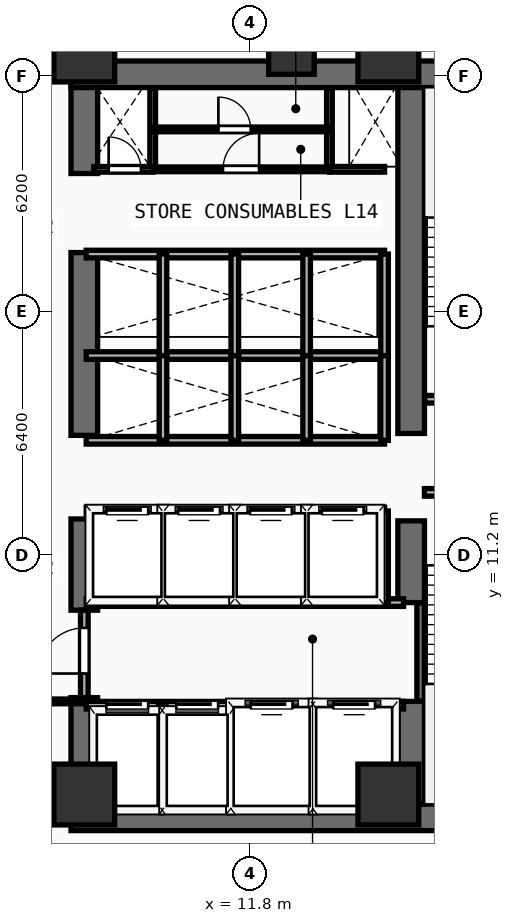
"""IFC4 building model, lengths in metres.
Left out: names, types, materials, properties, quantities, classifications, styles, units other than length and angle.
Written with IfcOpenShell. Run it as: python <this file> out.ifc"""

import sys

from ifc_helpers import new_model, si_unit, direction, frame, frame_2d, origin, origin_2d, place, context, subcontext, project, spatial, rectangle, extrude, element, fill, save


model = new_model("IFC4")
c1 = context("Model", 3, precision=1e-05, world=origin(), true_north=direction((0.0, 1.0)))
c2 = subcontext(c1, "Body", "Model", "MODEL_VIEW")
j1 = project(units=[si_unit("LENGTHUNIT", "METRE"), si_unit("PLANEANGLEUNIT", "RADIAN")], contexts=[c1])
p1 = place(None, origin())
s1 = spatial("IfcSite", under=j1, at=p1, CompositionType="ELEMENT")
p2 = place(p1, origin())
s2 = spatial("IfcBuilding", under=s1, at=p2, CompositionType="ELEMENT")
p3 = place(p2, frame((0.0, 0.0, 56.2)))
s3 = spatial("IfcBuildingStorey", under=s2, at=p3, CompositionType="ELEMENT", Elevation=56.2)
for number, where, z_axis, x_axis in (
    (1, (7.1, 4.3, 0.0), (0.0, 0.0, 1.0), (1.0, 0.0, 0.0)),
    (2, (7.1, 23.85, 0.0), (0.0, 0.0, 1.0), (1.0, 0.0, 0.0)),
):
    element("IfcWall", number, at=place(p3, frame(where, z_axis=z_axis, x_axis=x_axis)), inside=s3, PredefinedType="SHEAR", context=c2, shape_type="SweptSolid", body=[
        extrude(rectangle(XDim=14.05, YDim=0.7, at=frame_2d((7.025, 0.0))), origin(), (0.0, 0.0, 1.0), 3.54),
    ])
p4 = place(p3, frame((7.45, 4.65, 0.0), z_axis=(0.0, 0.0, 1.0), x_axis=(0.0, 1.0, 0.0)))
e3 = element("IfcWall", 3, at=p4, inside=s3, PredefinedType="SHEAR", context=c2, shape_type="SweptSolid", body=[
    extrude(rectangle(XDim=2.8, YDim=0.7, at=frame_2d((1.4, 0.0))), origin(), (0.0, 0.0, 1.0), 3.54),
])
p5 = place(p3, frame((7.45, 9.75, 0.0), z_axis=(0.0, 0.0, 1.0), x_axis=(0.0, 1.0, 0.0)))
e4 = element("IfcWall", 4, at=p5, inside=s3, PredefinedType="SHEAR", context=c2, shape_type="SweptSolid", body=[
    extrude(rectangle(XDim=2.4, YDim=0.7, at=frame_2d((1.2, 0.0))), origin(), (0.0, 0.0, 1.0), 3.54),
])
p6 = place(p3, frame((7.45, 14.35, 0.0), z_axis=(0.0, 0.0, 1.0), x_axis=(0.0, 1.0, 0.0)))
e5 = element("IfcWall", 5, at=p6, inside=s3, PredefinedType="SHEAR", context=c2, shape_type="SweptSolid", body=[
    extrude(rectangle(XDim=4.81, YDim=0.7, at=frame_2d((2.405, 0.0))), origin(), (0.0, 0.0, 1.0), 3.54),
])
p7 = place(p3, frame((7.45, 21.24, 0.0), z_axis=(0.0, 0.0, 1.0), x_axis=(0.0, 1.0, 0.0)))
e6 = element("IfcWall", 6, at=p7, inside=s3, PredefinedType="SHEAR", context=c2, shape_type="SweptSolid", body=[
    extrude(rectangle(XDim=2.26, YDim=0.7, at=frame_2d((1.13, 0.0))), origin(), (0.0, 0.0, 1.0), 3.54),
])
p8 = place(p3, frame((16.05, 4.65, 0.0), z_axis=(0.0, 0.0, 1.0), x_axis=(0.0, 1.0, 0.0)))
e7 = element("IfcWall", 7, at=p8, inside=s3, PredefinedType="SHEAR", context=c2, shape_type="SweptSolid", body=[
    extrude(rectangle(XDim=2.7, YDim=0.7, at=frame_2d((1.35, 0.0))), origin(), (0.0, 0.0, 1.0), 3.54),
])
p9 = place(p3, frame((16.05, 9.95, 0.0), z_axis=(0.0, 0.0, 1.0), x_axis=(0.0, 1.0, 0.0)))
e8 = element("IfcWall", 8, at=p9, inside=s3, PredefinedType="SHEAR", context=c2, shape_type="SweptSolid", body=[
    extrude(rectangle(XDim=2.15, YDim=0.7, at=frame_2d((1.075, 0.0))), origin(), (0.0, 0.0, 1.0), 3.54),
])
p10 = place(p3, frame((16.05, 14.4, 0.0), z_axis=(0.0, 0.0, 1.0), x_axis=(0.0, 1.0, 0.0)))
e9 = element("IfcWall", 9, at=p10, inside=s3, PredefinedType="SHEAR", context=c2, shape_type="SweptSolid", body=[
    extrude(rectangle(XDim=9.1, YDim=0.7, at=frame_2d((4.55, 0.0))), origin(), (0.0, 0.0, 1.0), 3.54),
])
for number, where, z_axis, x_axis in (
    (10, (7.45, 4.9, 0.0), (0.0, 0.0, 1.0), (1.0, 0.0, 0.0)),
    (11, (15.45, 4.9, 0.0), (0.0, 0.0, 1.0), (1.0, 0.0, 0.0)),
    (12, (7.45, 24.45, 0.0), (0.0, 0.0, 1.0), (1.0, 0.0, 0.0)),
    (13, (15.45, 24.45, 0.0), (0.0, 0.0, 1.0), (1.0, 0.0, 0.0)),
):
    element("IfcColumn", number, at=place(p3, frame(where, z_axis=z_axis, x_axis=x_axis)), inside=s3, PredefinedType="COLUMN", context=c2, shape_type="SweptSolid", body=[
        extrude(rectangle(XDim=1.6, YDim=1.6, at=origin_2d()), origin(), (0.0, 0.0, 1.0), 3.54),
    ])
p11 = place(p3, frame((12.9, 24.45, 0.0), z_axis=(0.0, 0.0, 1.0), x_axis=(1.0, 0.0, 0.0)))
e14 = element("IfcColumn", 14, at=p11, inside=s3, PredefinedType="COLUMN", context=c2, shape_type="SweptSolid", body=[
    extrude(rectangle(XDim=1.2, YDim=1.2, at=origin_2d()), origin(), (0.0, 0.0, 1.0), 3.54),
])
p12 = place(p3, frame((16.3, 7.36, 0.0), z_axis=(0.0, 0.0, 1.0), x_axis=(0.0, 1.0, 0.0)))
e15 = element("IfcWall", 15, at=p12, inside=s3, PredefinedType="SHEAR", context=c2, shape_type="SweptSolid", body=[
    extrude(rectangle(XDim=2.58, YDim=0.2, at=frame_2d((1.29, 0.0))), origin(), (0.0, 0.0, 1.0), 3.54),
])
p13 = place(p3, frame((16.4, 12.85, 0.0), z_axis=(0.0, 0.0, 1.0), x_axis=(1.0, 0.0, 0.0)))
e16 = element("IfcWall", 16, at=p13, inside=s3, PredefinedType="PARTITIONING", context=c2, shape_type="SweptSolid", body=[
    extrude(rectangle(XDim=3.96, YDim=0.2, at=frame_2d((1.98, 0.0))), origin(), (0.0, 0.0, 1.0), 3.54),
])
p14 = place(p13, frame((1.304, 0.0, 0.0)))
e17 = element("IfcOpeningElement", 17, at=p14, cuts=e16, PredefinedType="OPENING", context=c2, shape_type="SweptSolid", body=[
    extrude(rectangle(XDim=1.1, YDim=2.2, at=frame_2d((0.55, 1.1))), frame((0.0, 0.11, 0.0), z_axis=(0.0, -1.0, 0.0), x_axis=(1.0, 0.0, 0.0)), (0.0, 0.0, 1.0), 0.22),
])
p15 = place(p3, frame((16.41, 15.3, 0.0), z_axis=(0.0, 0.0, 1.0), x_axis=(1.0, 0.0, 0.0)))
e18 = element("IfcWall", 18, at=p15, inside=s3, PredefinedType="PARTITIONING", context=c2, shape_type="SweptSolid", body=[
    extrude(rectangle(XDim=3.95, YDim=0.2, at=frame_2d((1.975, 0.0))), origin(), (0.0, 0.0, 1.0), 3.54),
])
p16 = place(p15, frame((1.294, 0.0, 0.0)))
e19 = element("IfcOpeningElement", 19, at=p16, cuts=e18, PredefinedType="OPENING", context=c2, shape_type="SweptSolid", body=[
    extrude(rectangle(XDim=1.1, YDim=2.2, at=frame_2d((0.55, 1.1))), frame((0.0, 0.11, 0.0), z_axis=(0.0, -1.0, 0.0), x_axis=(1.0, 0.0, 0.0)), (0.0, 0.0, 1.0), 0.22),
])
p17 = place(p3, frame((7.5, 7.25, 0.0), z_axis=(0.0, 0.0, 1.0), x_axis=(1.0, 0.0, 0.0)))
e20 = element("IfcWall", 20, at=p17, inside=s3, PredefinedType="PARTITIONING", context=c2, shape_type="SweptSolid", body=[
    extrude(rectangle(XDim=8.35, YDim=0.2, at=frame_2d((4.175, 0.0))), origin(), (0.0, 0.0, 1.0), 3.54),
])
p18 = place(p17, frame((0.53, 0.0, 0.0)))
e21 = element("IfcOpeningElement", 21, at=p18, cuts=e20, PredefinedType="OPENING", context=c2, shape_type="SweptSolid", body=[
    extrude(rectangle(XDim=1.1, YDim=2.2, at=frame_2d((0.55, 1.1))), frame((0.0, 0.11, 0.0), z_axis=(0.0, -1.0, 0.0), x_axis=(1.0, 0.0, 0.0)), (0.0, 0.0, 1.0), 0.22),
])
p19 = place(p17, frame((2.37, 0.0, 0.0)))
e22 = element("IfcOpeningElement", 22, at=p19, cuts=e20, PredefinedType="OPENING", context=c2, shape_type="SweptSolid", body=[
    extrude(rectangle(XDim=1.1, YDim=2.2, at=frame_2d((0.55, 1.1))), frame((0.0, 0.11, 0.0), z_axis=(0.0, -1.0, 0.0), x_axis=(1.0, 0.0, 0.0)), (0.0, 0.0, 1.0), 0.22),
])
p20 = place(p17, frame((4.33, 0.0, 0.0)))
e23 = element("IfcOpeningElement", 23, at=p20, cuts=e20, PredefinedType="OPENING", context=c2, shape_type="SweptSolid", body=[
    extrude(rectangle(XDim=1.1, YDim=2.2, at=frame_2d((0.55, 1.1))), frame((0.0, 0.11, 0.0), z_axis=(0.0, -1.0, 0.0), x_axis=(1.0, 0.0, 0.0)), (0.0, 0.0, 1.0), 0.22),
])
p21 = place(p17, frame((6.5, 0.0, 0.0)))
e24 = element("IfcOpeningElement", 24, at=p21, cuts=e20, PredefinedType="OPENING", context=c2, shape_type="SweptSolid", body=[
    extrude(rectangle(XDim=1.1, YDim=2.2, at=frame_2d((0.55, 1.1))), frame((0.0, 0.11, 0.0), z_axis=(0.0, -1.0, 0.0), x_axis=(1.0, 0.0, 0.0)), (0.0, 0.0, 1.0), 0.22),
])
p22 = place(p3, frame((7.5, 9.95, 0.0), z_axis=(0.0, 0.0, 1.0), x_axis=(1.0, 0.0, 0.0)))
e25 = element("IfcWall", 25, at=p22, inside=s3, PredefinedType="PARTITIONING", context=c2, shape_type="SweptSolid", body=[
    extrude(rectangle(XDim=8.35, YDim=0.2, at=frame_2d((4.175, 0.0))), origin(), (0.0, 0.0, 1.0), 3.54),
])
for number, where, z_axis, x_axis in (
    (26, (9.5, 4.45, 0.0), (0.0, 0.0, 1.0), (0.0, 1.0, 0.0)),
    (27, (11.36, 4.45, 0.0), (0.0, 0.0, 1.0), (0.0, 1.0, 0.0)),
    (28, (13.46, 4.45, 0.0), (0.0, 0.0, 1.0), (0.0, 1.0, 0.0)),
):
    element("IfcWall", number, at=place(p3, frame(where, z_axis=z_axis, x_axis=x_axis)), inside=s3, PredefinedType="PARTITIONING", context=c2, shape_type="SweptSolid", body=[
        extrude(rectangle(XDim=2.8, YDim=0.2, at=frame_2d((1.4, 0.0))), origin(), (0.0, 0.0, 1.0), 3.54),
    ])
p23 = place(p3, frame((7.45, 7.45, 0.0), z_axis=(0.0, 0.0, 1.0), x_axis=(0.0, 1.0, 0.0)))
e29 = element("IfcWall", 29, at=p23, inside=s3, PredefinedType="PARTITIONING", context=c2, shape_type="SweptSolid", body=[
    extrude(rectangle(XDim=2.3, YDim=0.2, at=frame_2d((1.15, 0.0))), origin(), (0.0, 0.0, 1.0), 2.52),
])
p24 = place(p23, frame((0.633, 0.0, 0.0)))
e30 = element("IfcOpeningElement", 30, at=p24, cuts=e29, PredefinedType="OPENING", context=c2, shape_type="SweptSolid", body=[
    extrude(rectangle(XDim=1.2, YDim=2.25, at=frame_2d((0.6, 1.125))), frame((0.0, 0.11, 0.0), z_axis=(0.0, -1.0, 0.0), x_axis=(1.0, 0.0, 0.0)), (0.0, 0.0, 1.0), 0.22),
])
p25 = place(p3, frame((7.5, 12.36, 0.0), z_axis=(0.0, 0.0, 1.0), x_axis=(1.0, 0.0, 0.0)))
e31 = element("IfcWall", 31, at=p25, inside=s3, PredefinedType="PARTITIONING", context=c2, shape_type="SweptSolid", body=[
    extrude(rectangle(XDim=7.85, YDim=0.2, at=frame_2d((3.925, 0.0))), origin(), (0.0, 0.0, 1.0), 3.54),
])
p26 = place(p25, frame((0.53, 0.0, 0.0)))
e32 = element("IfcOpeningElement", 32, at=p26, cuts=e31, PredefinedType="OPENING", context=c2, shape_type="SweptSolid", body=[
    extrude(rectangle(XDim=1.1, YDim=2.2, at=frame_2d((0.55, 1.1))), frame((0.0, 0.11, 0.0), z_axis=(0.0, -1.0, 0.0), x_axis=(1.0, 0.0, 0.0)), (0.0, 0.0, 1.0), 0.22),
])
p27 = place(p25, frame((2.42, 0.0, 0.0)))
e33 = element("IfcOpeningElement", 33, at=p27, cuts=e31, PredefinedType="OPENING", context=c2, shape_type="SweptSolid", body=[
    extrude(rectangle(XDim=1.1, YDim=2.2, at=frame_2d((0.55, 1.1))), frame((0.0, 0.11, 0.0), z_axis=(0.0, -1.0, 0.0), x_axis=(1.0, 0.0, 0.0)), (0.0, 0.0, 1.0), 0.22),
])
p28 = place(p25, frame((4.31, 0.0, 0.0)))
e34 = element("IfcOpeningElement", 34, at=p28, cuts=e31, PredefinedType="OPENING", context=c2, shape_type="SweptSolid", body=[
    extrude(rectangle(XDim=1.1, YDim=2.2, at=frame_2d((0.55, 1.1))), frame((0.0, 0.11, 0.0), z_axis=(0.0, -1.0, 0.0), x_axis=(1.0, 0.0, 0.0)), (0.0, 0.0, 1.0), 0.22),
])
p29 = place(p25, frame((6.2, 0.0, 0.0)))
e35 = element("IfcOpeningElement", 35, at=p29, cuts=e31, PredefinedType="OPENING", context=c2, shape_type="SweptSolid", body=[
    extrude(rectangle(XDim=1.1, YDim=2.2, at=frame_2d((0.55, 1.1))), frame((0.0, 0.11, 0.0), z_axis=(0.0, -1.0, 0.0), x_axis=(1.0, 0.0, 0.0)), (0.0, 0.0, 1.0), 0.22),
])
for number, where, z_axis, x_axis in (
    (36, (15.35, 9.95, 0.0), (0.0, 0.0, 1.0), (0.0, 1.0, 0.0)),
    (37, (9.52, 9.95, 0.0), (0.0, 0.0, 1.0), (0.0, 1.0, 0.0)),
    (38, (11.41, 9.95, 0.0), (0.0, 0.0, 1.0), (0.0, 1.0, 0.0)),
    (39, (13.3, 9.95, 0.0), (0.0, 0.0, 1.0), (0.0, 1.0, 0.0)),
):
    element("IfcWall", number, at=place(p3, frame(where, z_axis=z_axis, x_axis=x_axis)), inside=s3, PredefinedType="PARTITIONING", context=c2, shape_type="SweptSolid", body=[
        extrude(rectangle(XDim=2.41, YDim=0.2, at=frame_2d((1.205, 0.0))), origin(), (0.0, 0.0, 1.0), 3.54),
    ])
for number, where, z_axis, x_axis in (
    (40, (7.5, 14.22, 0.0), (0.0, 0.0, 1.0), (1.0, 0.0, 0.0)),
    (41, (7.5, 16.45, 0.0), (0.0, 0.0, 1.0), (1.0, 0.0, 0.0)),
):
    element("IfcWall", number, at=place(p3, frame(where, z_axis=z_axis, x_axis=x_axis)), inside=s3, PredefinedType="PARTITIONING", context=c2, shape_type="SweptSolid", body=[
        extrude(rectangle(XDim=7.85, YDim=0.2, at=frame_2d((3.925, 0.0))), origin(), (0.0, 0.0, 1.0), 3.54),
    ])
for number, where, z_axis, x_axis in (
    (42, (15.35, 14.22, 0.0), (0.0, 0.0, 1.0), (0.0, 1.0, 0.0)),
    (43, (9.52, 14.22, 0.0), (0.0, 0.0, 1.0), (0.0, 1.0, 0.0)),
    (44, (11.41, 14.22, 0.0), (0.0, 0.0, 1.0), (0.0, 1.0, 0.0)),
    (45, (13.3, 14.22, 0.0), (0.0, 0.0, 1.0), (0.0, 1.0, 0.0)),
):
    element("IfcWall", number, at=place(p3, frame(where, z_axis=z_axis, x_axis=x_axis)), inside=s3, PredefinedType="PARTITIONING", context=c2, shape_type="SweptSolid", body=[
        extrude(rectangle(XDim=2.23, YDim=0.2, at=frame_2d((1.115, 0.0))), origin(), (0.0, 0.0, 1.0), 3.54),
    ])
p30 = place(p3, frame((7.5, 19.12, 0.0), z_axis=(0.0, 0.0, 1.0), x_axis=(1.0, 0.0, 0.0)))
e46 = element("IfcWall", 46, at=p30, inside=s3, PredefinedType="PARTITIONING", context=c2, shape_type="SweptSolid", body=[
    extrude(rectangle(XDim=7.85, YDim=0.2, at=frame_2d((3.925, 0.0))), origin(), (0.0, 0.0, 1.0), 3.54),
])
for number, where, z_axis, x_axis in (
    (47, (15.35, 16.45, 0.0), (0.0, 0.0, 1.0), (0.0, 1.0, 0.0)),
    (48, (9.52, 16.45, 0.0), (0.0, 0.0, 1.0), (0.0, 1.0, 0.0)),
    (49, (11.41, 16.45, 0.0), (0.0, 0.0, 1.0), (0.0, 1.0, 0.0)),
    (50, (13.3, 16.45, 0.0), (0.0, 0.0, 1.0), (0.0, 1.0, 0.0)),
):
    element("IfcWall", number, at=place(p3, frame(where, z_axis=z_axis, x_axis=x_axis)), inside=s3, PredefinedType="PARTITIONING", context=c2, shape_type="SweptSolid", body=[
        extrude(rectangle(XDim=2.67, YDim=0.2, at=frame_2d((1.335, 0.0))), origin(), (0.0, 0.0, 1.0), 3.54),
    ])
for number, where, z_axis, x_axis in (
    (51, (9.25, 21.35, 0.0), (0.0, 0.0, 1.0), (0.0, 1.0, 0.0)),
    (52, (13.9, 21.35, 0.0), (0.0, 0.0, 1.0), (0.0, 1.0, 0.0)),
):
    element("IfcWall", number, at=place(p3, frame(where, z_axis=z_axis, x_axis=x_axis)), inside=s3, PredefinedType="PARTITIONING", context=c2, shape_type="SweptSolid", body=[
        extrude(rectangle(XDim=2.13, YDim=0.15, at=frame_2d((1.065, 0.0))), origin(), (0.0, 0.0, 1.0), 3.54),
    ])
p31 = place(p3, frame((7.7, 21.35, 0.0), z_axis=(0.0, 0.0, 1.0), x_axis=(1.0, 0.0, 0.0)))
e53 = element("IfcWall", 53, at=p31, inside=s3, PredefinedType="PARTITIONING", context=c2, shape_type="SweptSolid", body=[
    extrude(rectangle(XDim=1.55, YDim=0.15, at=frame_2d((0.775, 0.0))), origin(), (0.0, 0.0, 1.0), 3.54),
])
p32 = place(p31, frame((0.39, 0.0, 0.0)))
e54 = element("IfcOpeningElement", 54, at=p32, cuts=e53, PredefinedType="OPENING", context=c2, shape_type="SweptSolid", body=[
    extrude(rectangle(XDim=0.85, YDim=2.15, at=frame_2d((0.425, 1.075))), frame((0.0, 0.085, 0.0), z_axis=(0.0, -1.0, 0.0), x_axis=(1.0, 0.0, 0.0)), (0.0, 0.0, 1.0), 0.17),
])
p33 = place(p3, frame((13.9, 21.35, 0.0), z_axis=(0.0, 0.0, 1.0), x_axis=(1.0, 0.0, 0.0)))
e55 = element("IfcWall", 55, at=p33, inside=s3, PredefinedType="PARTITIONING", context=c2, shape_type="SweptSolid", body=[
    extrude(rectangle(XDim=1.45, YDim=0.15, at=frame_2d((0.725, 0.0))), origin(), (0.0, 0.0, 1.0), 3.54),
])
p34 = place(p3, frame((9.25, 21.35, 0.0), z_axis=(0.0, 0.0, 1.0), x_axis=(1.0, 0.0, 0.0)))
e56 = element("IfcWall", 56, at=p34, inside=s3, PredefinedType="PARTITIONING", context=c2, shape_type="SweptSolid", body=[
    extrude(rectangle(XDim=4.65, YDim=0.125, at=frame_2d((2.325, 0.0))), origin(), (0.0, 0.0, 1.0), 3.54),
])
p35 = place(p34, frame((1.85, 0.0, 0.0)))
e57 = element("IfcOpeningElement", 57, at=p35, cuts=e56, PredefinedType="OPENING", context=c2, shape_type="SweptSolid", body=[
    extrude(rectangle(XDim=0.95, YDim=2.15, at=frame_2d((0.475, 1.075))), frame((0.0, 0.073, 0.0), z_axis=(0.0, -1.0, 0.0), x_axis=(1.0, 0.0, 0.0)), (0.0, 0.0, 1.0), 0.145),
])
p36 = place(p3, frame((9.25, 22.4, 0.0), z_axis=(0.0, 0.0, 1.0), x_axis=(1.0, 0.0, 0.0)))
e58 = element("IfcWall", 58, at=p36, inside=s3, PredefinedType="PARTITIONING", context=c2, shape_type="SweptSolid", body=[
    extrude(rectangle(XDim=4.65, YDim=0.125, at=frame_2d((2.325, 0.0))), origin(), (0.0, 0.0, 1.0), 3.54),
])
p37 = place(p36, frame((1.728, 0.0, 0.0)))
e59 = element("IfcOpeningElement", 59, at=p37, cuts=e58, PredefinedType="OPENING", context=c2, shape_type="SweptSolid", body=[
    extrude(rectangle(XDim=0.85, YDim=2.15, at=frame_2d((0.425, 1.075))), frame((0.0, 0.073, 0.0), z_axis=(0.0, -1.0, 0.0), x_axis=(1.0, 0.0, 0.0)), (0.0, 0.0, 1.0), 0.145),
])
p38 = place(p3, frame((1.64, 7.35, 0.0), z_axis=(0.0, 0.0, 1.0), x_axis=(1.0, 0.0, 0.0)))
e60 = element("IfcWall", 60, at=p38, inside=s3, PredefinedType="PARTITIONING", context=c2, shape_type="SweptSolid", body=[
    extrude(rectangle(XDim=5.76, YDim=0.125, at=frame_2d((2.88, 0.0))), origin(), (0.0, 0.0, 1.0), 3.54),
])
p39 = place(p38, frame((4.087, 0.0, 0.0)))
e61 = element("IfcOpeningElement", 61, at=p39, cuts=e60, PredefinedType="OPENING", context=c2, shape_type="SweptSolid", body=[
    extrude(rectangle(XDim=0.85, YDim=2.15, at=frame_2d((0.425, 1.075))), frame((0.0, 0.073, 0.0), z_axis=(0.0, -1.0, 0.0), x_axis=(1.0, 0.0, 0.0)), (0.0, 0.0, 1.0), 0.145),
])
p40 = place(p18, origin())
e62 = element("IfcDoor", 62, at=p40, inside=s3, OperationType="SLIDING_TO_LEFT", PredefinedType="DOOR", context=c2, shape_type="SweptSolid", body=[
    extrude(rectangle(XDim=1.1, YDim=2.2, at=frame_2d((0.55, 1.1))), frame((0.0, 0.025, 0.0), z_axis=(0.0, -1.0, 0.0), x_axis=(1.0, 0.0, 0.0)), (0.0, 0.0, 1.0), 0.05),
])
fill(e21, e62)
p41 = place(p19, origin())
e63 = element("IfcDoor", 63, at=p41, inside=s3, OperationType="SLIDING_TO_LEFT", PredefinedType="DOOR", context=c2, shape_type="SweptSolid", body=[
    extrude(rectangle(XDim=1.1, YDim=2.2, at=frame_2d((0.55, 1.1))), frame((0.0, 0.025, 0.0), z_axis=(0.0, -1.0, 0.0), x_axis=(1.0, 0.0, 0.0)), (0.0, 0.0, 1.0), 0.05),
])
fill(e22, e63)
p42 = place(p20, origin())
e64 = element("IfcDoor", 64, at=p42, inside=s3, OperationType="SLIDING_TO_LEFT", PredefinedType="DOOR", context=c2, shape_type="SweptSolid", body=[
    extrude(rectangle(XDim=1.1, YDim=2.2, at=frame_2d((0.55, 1.1))), frame((0.0, 0.025, 0.0), z_axis=(0.0, -1.0, 0.0), x_axis=(1.0, 0.0, 0.0)), (0.0, 0.0, 1.0), 0.05),
])
fill(e23, e64)
p43 = place(p21, origin())
e65 = element("IfcDoor", 65, at=p43, inside=s3, OperationType="SLIDING_TO_LEFT", PredefinedType="DOOR", context=c2, shape_type="SweptSolid", body=[
    extrude(rectangle(XDim=1.1, YDim=2.2, at=frame_2d((0.55, 1.1))), frame((0.0, 0.025, 0.0), z_axis=(0.0, -1.0, 0.0), x_axis=(1.0, 0.0, 0.0)), (0.0, 0.0, 1.0), 0.05),
])
fill(e24, e65)
p44 = place(p24, frame((1.2, 0.0, 0.0), z_axis=(0.0, 0.0, 1.0), x_axis=(-1.0, 0.0, 0.0)))
e66 = element("IfcDoor", 66, at=p44, inside=s3, OperationType="SINGLE_SWING_RIGHT", PredefinedType="DOOR", context=c2, shape_type="SweptSolid", body=[
    extrude(rectangle(XDim=1.2, YDim=2.25, at=frame_2d((0.6, 1.125))), frame((0.0, 0.025, 0.0), z_axis=(0.0, -1.0, 0.0), x_axis=(1.0, 0.0, 0.0)), (0.0, 0.0, 1.0), 0.05),
])
fill(e30, e66)
p45 = place(p26, origin())
e67 = element("IfcDoor", 67, at=p45, inside=s3, OperationType="SLIDING_TO_LEFT", PredefinedType="DOOR", context=c2, shape_type="SweptSolid", body=[
    extrude(rectangle(XDim=1.1, YDim=2.2, at=frame_2d((0.55, 1.1))), frame((0.0, 0.025, 0.0), z_axis=(0.0, -1.0, 0.0), x_axis=(1.0, 0.0, 0.0)), (0.0, 0.0, 1.0), 0.05),
])
fill(e32, e67)
p46 = place(p27, origin())
e68 = element("IfcDoor", 68, at=p46, inside=s3, OperationType="SLIDING_TO_LEFT", PredefinedType="DOOR", context=c2, shape_type="SweptSolid", body=[
    extrude(rectangle(XDim=1.1, YDim=2.2, at=frame_2d((0.55, 1.1))), frame((0.0, 0.025, 0.0), z_axis=(0.0, -1.0, 0.0), x_axis=(1.0, 0.0, 0.0)), (0.0, 0.0, 1.0), 0.05),
])
fill(e33, e68)
p47 = place(p28, origin())
e69 = element("IfcDoor", 69, at=p47, inside=s3, OperationType="SLIDING_TO_LEFT", PredefinedType="DOOR", context=c2, shape_type="SweptSolid", body=[
    extrude(rectangle(XDim=1.1, YDim=2.2, at=frame_2d((0.55, 1.1))), frame((0.0, 0.025, 0.0), z_axis=(0.0, -1.0, 0.0), x_axis=(1.0, 0.0, 0.0)), (0.0, 0.0, 1.0), 0.05),
])
fill(e34, e69)
p48 = place(p29, origin())
e70 = element("IfcDoor", 70, at=p48, inside=s3, OperationType="SLIDING_TO_LEFT", PredefinedType="DOOR", context=c2, shape_type="SweptSolid", body=[
    extrude(rectangle(XDim=1.1, YDim=2.2, at=frame_2d((0.55, 1.1))), frame((0.0, 0.025, 0.0), z_axis=(0.0, -1.0, 0.0), x_axis=(1.0, 0.0, 0.0)), (0.0, 0.0, 1.0), 0.05),
])
fill(e35, e70)
p49 = place(p32, origin())
e71 = element("IfcDoor", 71, at=p49, inside=s3, OperationType="SINGLE_SWING_LEFT", PredefinedType="DOOR", context=c2, shape_type="SweptSolid", body=[
    extrude(rectangle(XDim=0.85, YDim=2.15, at=frame_2d((0.425, 1.075))), frame((0.0, 0.025, 0.0), z_axis=(0.0, -1.0, 0.0), x_axis=(1.0, 0.0, 0.0)), (0.0, 0.0, 1.0), 0.05),
])
fill(e54, e71)
p50 = place(p35, origin())
e72 = element("IfcDoor", 72, at=p50, inside=s3, OperationType="SINGLE_SWING_RIGHT", PredefinedType="DOOR", context=c2, shape_type="SweptSolid", body=[
    extrude(rectangle(XDim=0.95, YDim=2.15, at=frame_2d((0.475, 1.075))), frame((0.0, 0.025, 0.0), z_axis=(0.0, -1.0, 0.0), x_axis=(1.0, 0.0, 0.0)), (0.0, 0.0, 1.0), 0.05),
])
fill(e57, e72)
p51 = place(p37, origin())
e73 = element("IfcDoor", 73, at=p51, inside=s3, OperationType="SINGLE_SWING_LEFT", PredefinedType="DOOR", context=c2, shape_type="SweptSolid", body=[
    extrude(rectangle(XDim=0.85, YDim=2.15, at=frame_2d((0.425, 1.075))), frame((0.0, 0.025, 0.0), z_axis=(0.0, -1.0, 0.0), x_axis=(1.0, 0.0, 0.0)), (0.0, 0.0, 1.0), 0.05),
])
fill(e59, e73)
save(model, sys.argv[1])
